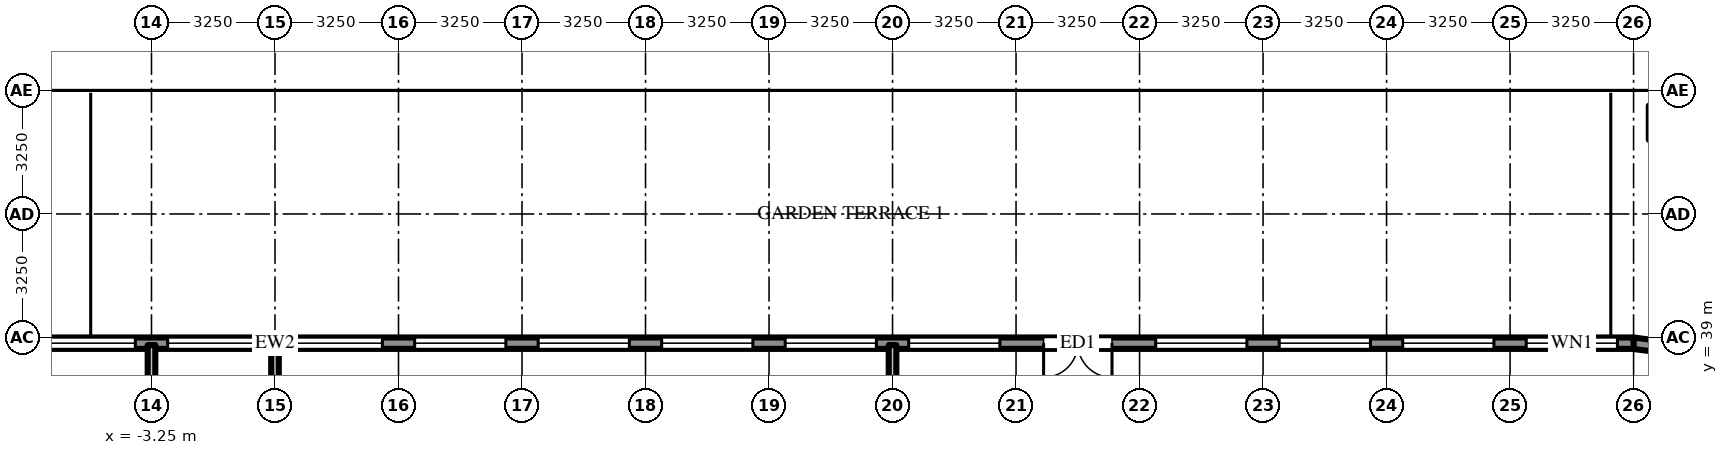
"""IFC4 building model, lengths in metres.
Left out: names, types, materials, properties, quantities, classifications, styles, units other than length and angle.
Written with IfcOpenShell. Run it as: python <this file> out.ifc"""

import sys

from ifc_helpers import new_model, si_unit, direction, frame, frame_2d, origin, place, context, subcontext, project, spatial, polyline, rectangle, outline, extrude, source, transform, mapped, element, fill, save


model = new_model("IFC4")
c1 = context("Model", 3, precision=1e-05, world=origin(), true_north=direction((0.0, 1.0)))
c2 = subcontext(c1, "Body", "Model", "MODEL_VIEW")
j1 = project(units=[si_unit("LENGTHUNIT", "METRE"), si_unit("PLANEANGLEUNIT", "RADIAN")], contexts=[c1])
p1 = place(None, origin())
s1 = spatial("IfcSite", under=j1, at=p1, CompositionType="ELEMENT")
p2 = place(p1, origin())
s2 = spatial("IfcBuilding", under=s1, at=p2, CompositionType="ELEMENT")
p3 = place(p2, frame((0.0, 0.0, 14.0)))
s3 = spatial("IfcBuildingStorey", under=s2, at=p3, CompositionType="ELEMENT", Elevation=14.0)
m1 = source(origin(), c2, "Body", "SweptSolid", [
    extrude(outline(polyline([(39.0, 35.75), (38.889, 36.591), (38.565, 37.375), (38.048, 38.048), (37.375, 38.565), (36.591, 38.889), (35.75, 39.0), (35.73, 38.7), (36.513, 38.597), (37.224, 38.302), (37.834, 37.834), (38.302, 37.224), (38.597, 36.513), (38.7, 35.73), (39.0, 35.75)])), origin(), (0.0, 0.0, 1.0), 4.7),
])
p4 = place(p3, origin())
e1 = element("IfcWall", 1, at=p4, inside=s3, PredefinedType="SOLIDWALL", context=c2, shape_type="MappedRepresentation", body=[
    mapped(m1, transform((0.0, 0.0, 0.0))),
])
m2 = source(origin(), c2, "Body", "SweptSolid", [
    extrude(rectangle(XDim=71.5, YDim=0.3, at=frame_2d((35.75, 0.0))), origin(), (0.0, 0.0, 1.0), 4.7),
])
p5 = place(p3, frame((35.75, 38.85, 0.0), z_axis=(0.0, 0.0, 1.0), x_axis=(-1.0, 0.0, 0.0)))
e2 = element("IfcWall", 2, at=p5, inside=s3, PredefinedType="SOLIDWALL", context=c2, shape_type="MappedRepresentation", body=[
    mapped(m2, transform((0.0, 0.0, 0.0))),
])
m3 = source(origin(), c2, "Body", "SweptSolid", [
    extrude(rectangle(XDim=2.4, YDim=3.0, at=frame_2d((1.2, 1.5))), frame((0.0, 0.16, 0.0), z_axis=(0.0, -1.0, 0.0), x_axis=(1.0, 0.0, 0.0)), (0.0, 0.0, 1.0), 0.32),
])
p6 = place(p5, frame((0.425, 0.0, 0.9)))
e3 = element("IfcOpeningElement", 3, at=p6, cuts=e2, PredefinedType="OPENING", context=c2, shape_type="MappedRepresentation", body=[
    mapped(m3, transform((0.0, 0.0, 0.0))),
])
p7 = place(p5, frame((3.675, 0.0, 0.9)))
e4 = element("IfcOpeningElement", 4, at=p7, cuts=e2, PredefinedType="OPENING", context=c2, shape_type="MappedRepresentation", body=[
    mapped(m3, transform((0.0, 0.0, 0.0))),
])
p8 = place(p5, frame((6.925, 0.0, 0.9)))
e5 = element("IfcOpeningElement", 5, at=p8, cuts=e2, PredefinedType="OPENING", context=c2, shape_type="MappedRepresentation", body=[
    mapped(m3, transform((0.0, 0.0, 0.0))),
])
p9 = place(p5, frame((10.175, 0.0, 0.9)))
e6 = element("IfcOpeningElement", 6, at=p9, cuts=e2, PredefinedType="OPENING", context=c2, shape_type="MappedRepresentation", body=[
    mapped(m3, transform((0.0, 0.0, 0.0))),
])
m4 = source(origin(), c2, "Body", "SweptSolid", [
    extrude(rectangle(XDim=1.8, YDim=2.4, at=frame_2d((0.9, 1.2))), frame((0.0, 0.16, 0.0), z_axis=(0.0, -1.0, 0.0), x_axis=(1.0, 0.0, 0.0)), (0.0, 0.0, 1.0), 0.32),
])
p10 = place(p5, frame((13.725, 0.0, 0.0)))
e7 = element("IfcOpeningElement", 7, at=p10, cuts=e2, PredefinedType="OPENING", context=c2, shape_type="MappedRepresentation", body=[
    mapped(m4, transform((0.0, 0.0, 0.0))),
])
p11 = place(p5, frame((16.675, 0.0, 0.9)))
e8 = element("IfcOpeningElement", 8, at=p11, cuts=e2, PredefinedType="OPENING", context=c2, shape_type="MappedRepresentation", body=[
    mapped(m3, transform((0.0, 0.0, 0.0))),
])
p12 = place(p5, frame((19.925, 0.0, 0.9)))
e9 = element("IfcOpeningElement", 9, at=p12, cuts=e2, PredefinedType="OPENING", context=c2, shape_type="MappedRepresentation", body=[
    mapped(m3, transform((0.0, 0.0, 0.0))),
])
p13 = place(p5, frame((23.175, 0.0, 0.9)))
e10 = element("IfcOpeningElement", 10, at=p13, cuts=e2, PredefinedType="OPENING", context=c2, shape_type="MappedRepresentation", body=[
    mapped(m3, transform((0.0, 0.0, 0.0))),
])
p14 = place(p5, frame((26.425, 0.0, 0.9)))
e11 = element("IfcOpeningElement", 11, at=p14, cuts=e2, PredefinedType="OPENING", context=c2, shape_type="MappedRepresentation", body=[
    mapped(m3, transform((0.0, 0.0, 0.0))),
])
p15 = place(p5, frame((29.675, 0.0, 0.9)))
e12 = element("IfcOpeningElement", 12, at=p15, cuts=e2, PredefinedType="OPENING", context=c2, shape_type="MappedRepresentation", body=[
    mapped(m3, transform((0.0, 0.0, 0.0))),
])
p16 = place(p5, frame((32.925, 0.0, 0.9)))
e13 = element("IfcOpeningElement", 13, at=p16, cuts=e2, PredefinedType="OPENING", context=c2, shape_type="MappedRepresentation", body=[
    mapped(m3, transform((0.0, 0.0, 0.0))),
])
p17 = place(p5, frame((36.175, 0.0, 0.9)))
e14 = element("IfcOpeningElement", 14, at=p17, cuts=e2, PredefinedType="OPENING", context=c2, shape_type="MappedRepresentation", body=[
    mapped(m3, transform((0.0, 0.0, 0.0))),
])
p18 = place(p5, frame((39.425, 0.0, 0.9)))
e15 = element("IfcOpeningElement", 15, at=p18, cuts=e2, PredefinedType="OPENING", context=c2, shape_type="MappedRepresentation", body=[
    mapped(m3, transform((0.0, 0.0, 0.0))),
])
p19 = place(p5, frame((42.675, 0.0, 0.9)))
e16 = element("IfcOpeningElement", 16, at=p19, cuts=e2, PredefinedType="OPENING", context=c2, shape_type="MappedRepresentation", body=[
    mapped(m3, transform((0.0, 0.0, 0.0))),
])
p20 = place(p5, frame((45.925, 0.0, 0.9)))
e17 = element("IfcOpeningElement", 17, at=p20, cuts=e2, PredefinedType="OPENING", context=c2, shape_type="MappedRepresentation", body=[
    mapped(m3, transform((0.0, 0.0, 0.0))),
])
p21 = place(p5, frame((49.175, 0.0, 0.9)))
e18 = element("IfcOpeningElement", 18, at=p21, cuts=e2, PredefinedType="OPENING", context=c2, shape_type="MappedRepresentation", body=[
    mapped(m3, transform((0.0, 0.0, 0.0))),
])
p22 = place(p5, frame((52.425, 0.0, 0.9)))
e19 = element("IfcOpeningElement", 19, at=p22, cuts=e2, PredefinedType="OPENING", context=c2, shape_type="MappedRepresentation", body=[
    mapped(m3, transform((0.0, 0.0, 0.0))),
])
p23 = place(p5, frame((55.675, 0.0, 0.9)))
e20 = element("IfcOpeningElement", 20, at=p23, cuts=e2, PredefinedType="OPENING", context=c2, shape_type="MappedRepresentation", body=[
    mapped(m3, transform((0.0, 0.0, 0.0))),
])
p24 = place(p5, frame((58.925, 0.0, 0.9)))
e21 = element("IfcOpeningElement", 21, at=p24, cuts=e2, PredefinedType="OPENING", context=c2, shape_type="MappedRepresentation", body=[
    mapped(m3, transform((0.0, 0.0, 0.0))),
])
p25 = place(p5, frame((62.175, 0.0, 0.9)))
e22 = element("IfcOpeningElement", 22, at=p25, cuts=e2, PredefinedType="OPENING", context=c2, shape_type="MappedRepresentation", body=[
    mapped(m3, transform((0.0, 0.0, 0.0))),
])
p26 = place(p5, frame((65.425, 0.0, 0.9)))
e23 = element("IfcOpeningElement", 23, at=p26, cuts=e2, PredefinedType="OPENING", context=c2, shape_type="MappedRepresentation", body=[
    mapped(m3, transform((0.0, 0.0, 0.0))),
])
p27 = place(p5, frame((68.675, 0.0, 0.9)))
e24 = element("IfcOpeningElement", 24, at=p27, cuts=e2, PredefinedType="OPENING", context=c2, shape_type="MappedRepresentation", body=[
    mapped(m3, transform((0.0, 0.0, 0.0))),
])
m5 = source(origin(), c2, "Body", "SweptSolid", [
    extrude(rectangle(XDim=9.55, YDim=0.2, at=frame_2d((4.775, 0.0))), origin(), (0.0, 0.0, 1.0), 3.918),
])
for number, where, z_axis, x_axis in (
    (25, (-3.25, 29.25, 0.0), (0.0, 0.0, 1.0), (0.0, 1.0, 0.0)),
    (26, (0.0, 38.8, 0.0), (0.0, 0.0, 1.0), (0.0, -1.0, 0.0)),
):
    element("IfcWall", number, at=place(p3, frame(where, z_axis=z_axis, x_axis=x_axis)), inside=s3, PredefinedType="PARTITIONING", context=c2, shape_type="MappedRepresentation", body=[
        mapped(m5, transform((0.0, 0.0, 0.0))),
    ])
m6 = source(origin(), c2, "Body", "SweptSolid", [
    extrude(rectangle(XDim=8.7, YDim=0.2, at=frame_2d((4.35, 0.0))), origin(), (0.0, 0.0, 1.0), 3.762),
])
p28 = place(p3, frame((16.25, 30.1, 0.0), z_axis=(0.0, 0.0, 1.0), x_axis=(0.0, 1.0, 0.0)))
e27 = element("IfcWall", 27, at=p28, inside=s3, PredefinedType="PARTITIONING", context=c2, shape_type="MappedRepresentation", body=[
    mapped(m6, transform((0.0, 0.0, 0.0))),
])
m7 = source(origin(), c2, "Body", "SweptSolid", [
    extrude(rectangle(XDim=2.4, YDim=3.0, at=frame_2d((1.2, 1.5))), frame((0.0, 0.03, 0.0), z_axis=(0.0, -1.0, 0.0), x_axis=(1.0, 0.0, 0.0)), (0.0, 0.0, 1.0), 0.06),
])
p29 = place(p6, origin())
e28 = element("IfcWindow", 28, at=p29, inside=s3, PartitioningType="SINGLE_PANEL", PredefinedType="WINDOW", context=c2, shape_type="MappedRepresentation", body=[
    mapped(m7, transform((0.0, 0.0, 0.0))),
])
fill(e3, e28)
p30 = place(p7, origin())
e29 = element("IfcWindow", 29, at=p30, inside=s3, PartitioningType="SINGLE_PANEL", PredefinedType="WINDOW", context=c2, shape_type="MappedRepresentation", body=[
    mapped(m7, transform((0.0, 0.0, 0.0))),
])
fill(e4, e29)
p31 = place(p8, origin())
e30 = element("IfcWindow", 30, at=p31, inside=s3, PartitioningType="SINGLE_PANEL", PredefinedType="WINDOW", context=c2, shape_type="MappedRepresentation", body=[
    mapped(m7, transform((0.0, 0.0, 0.0))),
])
fill(e5, e30)
p32 = place(p9, origin())
e31 = element("IfcWindow", 31, at=p32, inside=s3, PartitioningType="SINGLE_PANEL", PredefinedType="WINDOW", context=c2, shape_type="MappedRepresentation", body=[
    mapped(m7, transform((0.0, 0.0, 0.0))),
])
fill(e6, e31)
m8 = source(origin(), c2, "Body", "SweptSolid", [
    extrude(rectangle(XDim=1.8, YDim=2.4, at=frame_2d((0.9, 1.2))), frame((0.0, 0.025, 0.0), z_axis=(0.0, -1.0, 0.0), x_axis=(1.0, 0.0, 0.0)), (0.0, 0.0, 1.0), 0.05),
])
p33 = place(p10, origin())
e32 = element("IfcDoor", 32, at=p33, inside=s3, OperationType="DOUBLE_DOOR_SINGLE_SWING", PredefinedType="DOOR", context=c2, shape_type="MappedRepresentation", body=[
    mapped(m8, transform((0.0, 0.0, 0.0))),
])
fill(e7, e32)
p34 = place(p11, origin())
e33 = element("IfcWindow", 33, at=p34, inside=s3, PartitioningType="SINGLE_PANEL", PredefinedType="WINDOW", context=c2, shape_type="MappedRepresentation", body=[
    mapped(m7, transform((0.0, 0.0, 0.0))),
])
fill(e8, e33)
p35 = place(p12, origin())
e34 = element("IfcWindow", 34, at=p35, inside=s3, PartitioningType="SINGLE_PANEL", PredefinedType="WINDOW", context=c2, shape_type="MappedRepresentation", body=[
    mapped(m7, transform((0.0, 0.0, 0.0))),
])
fill(e9, e34)
p36 = place(p13, origin())
e35 = element("IfcWindow", 35, at=p36, inside=s3, PartitioningType="SINGLE_PANEL", PredefinedType="WINDOW", context=c2, shape_type="MappedRepresentation", body=[
    mapped(m7, transform((0.0, 0.0, 0.0))),
])
fill(e10, e35)
p37 = place(p14, origin())
e36 = element("IfcWindow", 36, at=p37, inside=s3, PartitioningType="SINGLE_PANEL", PredefinedType="WINDOW", context=c2, shape_type="MappedRepresentation", body=[
    mapped(m7, transform((0.0, 0.0, 0.0))),
])
fill(e11, e36)
p38 = place(p15, origin())
e37 = element("IfcWindow", 37, at=p38, inside=s3, PartitioningType="SINGLE_PANEL", PredefinedType="WINDOW", context=c2, shape_type="MappedRepresentation", body=[
    mapped(m7, transform((0.0, 0.0, 0.0))),
])
fill(e12, e37)
p39 = place(p16, origin())
e38 = element("IfcWindow", 38, at=p39, inside=s3, PartitioningType="SINGLE_PANEL", PredefinedType="WINDOW", context=c2, shape_type="MappedRepresentation", body=[
    mapped(m7, transform((0.0, 0.0, 0.0))),
])
fill(e13, e38)
p40 = place(p17, origin())
e39 = element("IfcWindow", 39, at=p40, inside=s3, PartitioningType="SINGLE_PANEL", PredefinedType="WINDOW", context=c2, shape_type="MappedRepresentation", body=[
    mapped(m7, transform((0.0, 0.0, 0.0))),
])
fill(e14, e39)
p41 = place(p18, origin())
e40 = element("IfcWindow", 40, at=p41, inside=s3, PartitioningType="SINGLE_PANEL", PredefinedType="WINDOW", context=c2, shape_type="MappedRepresentation", body=[
    mapped(m7, transform((0.0, 0.0, 0.0))),
])
fill(e15, e40)
save(model, sys.argv[1])
